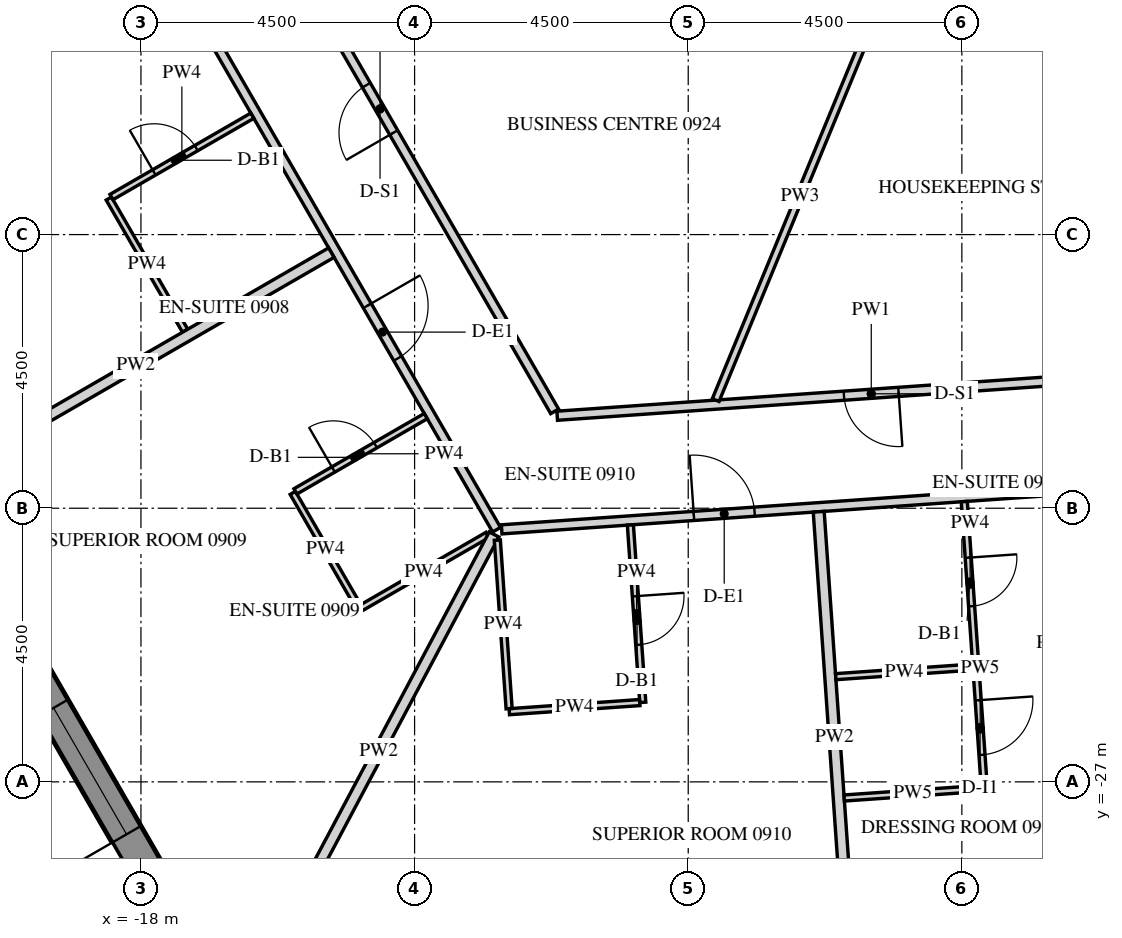
"""IFC4 building model, lengths in metres.
Left out: names, types, materials, properties, quantities, classifications, styles, units other than length and angle.
Written with IfcOpenShell. Run it as: python <this file> out.ifc"""

import sys

from ifc_helpers import new_model, si_unit, direction, frame, frame_2d, origin, place, context, subcontext, project, spatial, polyline, rectangle, outline, extrude, element, fill, save


model = new_model("IFC4")
c1 = context("Model", 3, precision=1e-05, world=origin(), true_north=direction((0.0, 1.0)))
c2 = subcontext(c1, "Body", "Model", "MODEL_VIEW")
j1 = project(units=[si_unit("LENGTHUNIT", "METRE"), si_unit("PLANEANGLEUNIT", "RADIAN")], contexts=[c1])
p1 = place(None, origin())
s1 = spatial("IfcSite", under=j1, at=p1, CompositionType="ELEMENT")
p2 = place(p1, origin())
s2 = spatial("IfcBuilding", under=s1, at=p2, CompositionType="ELEMENT")
p3 = place(p2, frame((0.0, 0.0, 123.3)))
s3 = spatial("IfcBuildingStorey", under=s2, at=p3, CompositionType="ELEMENT", Elevation=123.3)
p4 = place(p3, frame((-32.655, -2.89, -0.15), z_axis=(0.0, 0.0, 1.0), x_axis=(0.499997711317, -0.866026725152, 0.0)))
e1 = element("IfcWall", 1, at=p4, inside=s3, PredefinedType="SOLIDWALL", context=c2, shape_type="SweptSolid", body=[
    extrude(outline(polyline([(-0.022, -0.275), (30.097, -0.275), (30.045, 0.275), (0.022, 0.275), (-0.022, -0.275)])), origin(), (0.0, 0.0, 1.0), 3.9),
])
p5 = place(p4, frame((1.236, 0.0, 1.05)))
e2 = element("IfcOpeningElement", 2, at=p5, cuts=e1, PredefinedType="OPENING", context=c2, shape_type="SweptSolid", body=[
    extrude(rectangle(XDim=2.4, YDim=2.4, at=frame_2d((1.2, 1.2))), frame((0.0, 0.285, 0.0), z_axis=(0.0, -1.0, 0.0), x_axis=(1.0, 0.0, 0.0)), (0.0, 0.0, 1.0), 0.57),
])
p6 = place(p4, frame((4.835, 0.0, 1.05)))
e3 = element("IfcOpeningElement", 3, at=p6, cuts=e1, PredefinedType="OPENING", context=c2, shape_type="SweptSolid", body=[
    extrude(rectangle(XDim=2.4, YDim=2.4, at=frame_2d((1.2, 1.2))), frame((0.0, 0.285, 0.0), z_axis=(0.0, -1.0, 0.0), x_axis=(1.0, 0.0, 0.0)), (0.0, 0.0, 1.0), 0.57),
])
p7 = place(p4, frame((8.436, 0.0, 1.05)))
e4 = element("IfcOpeningElement", 4, at=p7, cuts=e1, PredefinedType="OPENING", context=c2, shape_type="SweptSolid", body=[
    extrude(rectangle(XDim=2.4, YDim=2.4, at=frame_2d((1.2, 1.2))), frame((0.0, 0.285, 0.0), z_axis=(0.0, -1.0, 0.0), x_axis=(1.0, 0.0, 0.0)), (0.0, 0.0, 1.0), 0.57),
])
p8 = place(p4, frame((12.035, 0.0, 1.05)))
e5 = element("IfcOpeningElement", 5, at=p8, cuts=e1, PredefinedType="OPENING", context=c2, shape_type="SweptSolid", body=[
    extrude(rectangle(XDim=2.4, YDim=2.4, at=frame_2d((1.2, 1.2))), frame((0.0, 0.285, 0.0), z_axis=(0.0, -1.0, 0.0), x_axis=(1.0, 0.0, 0.0)), (0.0, 0.0, 1.0), 0.57),
])
p9 = place(p4, frame((15.635, 0.0, 1.05)))
e6 = element("IfcOpeningElement", 6, at=p9, cuts=e1, PredefinedType="OPENING", context=c2, shape_type="SweptSolid", body=[
    extrude(rectangle(XDim=2.4, YDim=2.4, at=frame_2d((1.2, 1.2))), frame((0.0, 0.285, 0.0), z_axis=(0.0, -1.0, 0.0), x_axis=(1.0, 0.0, 0.0)), (0.0, 0.0, 1.0), 0.57),
])
p10 = place(p4, frame((19.236, 0.0, 1.05)))
e7 = element("IfcOpeningElement", 7, at=p10, cuts=e1, PredefinedType="OPENING", context=c2, shape_type="SweptSolid", body=[
    extrude(rectangle(XDim=2.4, YDim=2.4, at=frame_2d((1.2, 1.2))), frame((0.0, 0.285, 0.0), z_axis=(0.0, -1.0, 0.0), x_axis=(1.0, 0.0, 0.0)), (0.0, 0.0, 1.0), 0.57),
])
p11 = place(p4, frame((22.835, 0.0, 1.05)))
e8 = element("IfcOpeningElement", 8, at=p11, cuts=e1, PredefinedType="OPENING", context=c2, shape_type="SweptSolid", body=[
    extrude(rectangle(XDim=2.4, YDim=2.4, at=frame_2d((1.2, 1.2))), frame((0.0, 0.285, 0.0), z_axis=(0.0, -1.0, 0.0), x_axis=(1.0, 0.0, 0.0)), (0.0, 0.0, 1.0), 0.57),
])
p12 = place(p4, frame((26.436, 0.0, 1.05)))
e9 = element("IfcOpeningElement", 9, at=p12, cuts=e1, PredefinedType="OPENING", context=c2, shape_type="SweptSolid", body=[
    extrude(rectangle(XDim=2.4, YDim=2.4, at=frame_2d((1.2, 1.2))), frame((0.0, 0.285, 0.0), z_axis=(0.0, -1.0, 0.0), x_axis=(1.0, 0.0, 0.0)), (0.0, 0.0, 1.0), 0.57),
])
p13 = place(p3, frame((-24.09, -2.175, 0.0), z_axis=(0.0, 0.0, 1.0), x_axis=(0.499996832073, -0.86602723278, 0.0)))
e10 = element("IfcWall", 10, at=p13, inside=s3, PredefinedType="PARTITIONING", context=c2, shape_type="SweptSolid", body=[
    extrude(rectangle(XDim=23.877, YDim=0.15, at=frame_2d((11.938, 0.0))), origin(), (0.0, 0.0, 1.0), 2.988),
])
p14 = place(p13, frame((6.343, 0.0, 0.0)))
e11 = element("IfcOpeningElement", 11, at=p14, cuts=e10, PredefinedType="OPENING", context=c2, shape_type="SweptSolid", body=[
    extrude(rectangle(XDim=1.0, YDim=2.1, at=frame_2d((0.5, 1.05))), frame((0.0, 0.085, 0.0), z_axis=(0.0, -1.0, 0.0), x_axis=(1.0, 0.0, 0.0)), (0.0, 0.0, 1.0), 0.17),
])
p15 = place(p13, frame((13.172, 0.0, 0.0)))
e12 = element("IfcOpeningElement", 12, at=p15, cuts=e10, PredefinedType="OPENING", context=c2, shape_type="SweptSolid", body=[
    extrude(rectangle(XDim=1.0, YDim=2.1, at=frame_2d((0.5, 1.05))), frame((0.0, 0.085, 0.0), z_axis=(0.0, -1.0, 0.0), x_axis=(1.0, 0.0, 0.0)), (0.0, 0.0, 1.0), 0.17),
])
p16 = place(p13, frame((19.625, 0.0, 0.0)))
e13 = element("IfcOpeningElement", 13, at=p16, cuts=e10, PredefinedType="OPENING", context=c2, shape_type="SweptSolid", body=[
    extrude(rectangle(XDim=1.0, YDim=2.1, at=frame_2d((0.5, 1.05))), frame((0.0, 0.085, 0.0), z_axis=(0.0, -1.0, 0.0), x_axis=(1.0, 0.0, 0.0)), (0.0, 0.0, 1.0), 0.17),
])
p17 = place(p3, frame((-12.068, -22.847, 0.0), z_axis=(0.0, 0.0, 1.0), x_axis=(0.99756437486, 0.069751831595, 0.0)))
e14 = element("IfcWall", 14, at=p17, inside=s3, PredefinedType="PARTITIONING", context=c2, shape_type="SweptSolid", body=[
    extrude(rectangle(XDim=22.002, YDim=0.15, at=frame_2d((11.001, 0.0))), origin(), (0.0, 0.0, 1.0), 2.988),
])
p18 = place(p17, frame((3.169, 0.0, 0.0)))
e15 = element("IfcOpeningElement", 15, at=p18, cuts=e14, PredefinedType="OPENING", context=c2, shape_type="SweptSolid", body=[
    extrude(rectangle(XDim=1.0, YDim=2.1, at=frame_2d((0.5, 1.05))), frame((0.0, 0.085, 0.0), z_axis=(0.0, -1.0, 0.0), x_axis=(1.0, 0.0, 0.0)), (0.0, 0.0, 1.0), 0.17),
])
p19 = place(p17, frame((13.121, 0.0, 0.0)))
e16 = element("IfcOpeningElement", 16, at=p19, cuts=e14, PredefinedType="OPENING", context=c2, shape_type="SweptSolid", body=[
    extrude(rectangle(XDim=1.0, YDim=2.1, at=frame_2d((0.5, 1.05))), frame((0.0, 0.085, 0.0), z_axis=(0.0, -1.0, 0.0), x_axis=(1.0, 0.0, 0.0)), (0.0, 0.0, 1.0), 0.17),
])
p20 = place(p17, frame((20.852, 0.0, 0.0)))
e17 = element("IfcOpeningElement", 17, at=p20, cuts=e14, PredefinedType="OPENING", context=c2, shape_type="SweptSolid", body=[
    extrude(rectangle(XDim=1.0, YDim=2.1, at=frame_2d((0.5, 1.05))), frame((0.0, 0.085, 0.0), z_axis=(0.0, -1.0, 0.0), x_axis=(1.0, 0.0, 0.0)), (0.0, 0.0, 1.0), 0.17),
])
p21 = place(p3, frame((-0.825, -20.257, 0.0), z_axis=(0.0, 0.0, 1.0), x_axis=(-0.9975635143, -0.069764137903, 0.0)))
e18 = element("IfcWall", 18, at=p21, inside=s3, PredefinedType="PARTITIONING", context=c2, shape_type="SweptSolid", body=[
    extrude(rectangle(XDim=10.355, YDim=0.15, at=frame_2d((5.177, 0.0))), origin(), (0.0, 0.0, 1.0), 2.988),
])
p22 = place(p21, frame((4.728, 0.0, 0.0)))
e19 = element("IfcOpeningElement", 19, at=p22, cuts=e18, PredefinedType="OPENING", context=c2, shape_type="SweptSolid", body=[
    extrude(rectangle(XDim=0.9, YDim=2.1, at=frame_2d((0.45, 1.05))), frame((0.0, 0.085, 0.0), z_axis=(0.0, -1.0, 0.0), x_axis=(1.0, 0.0, 0.0)), (0.0, 0.0, 1.0), 0.17),
])
p23 = place(p3, frame((-11.197, -20.907, 0.0), z_axis=(0.0, 0.0, 1.0), x_axis=(-0.500004557924, 0.86602277225, 0.0)))
e20 = element("IfcWall", 20, at=p23, inside=s3, PredefinedType="PARTITIONING", context=c2, shape_type="SweptSolid", body=[
    extrude(rectangle(XDim=11.487, YDim=0.15, at=frame_2d((5.743, 0.0))), origin(), (0.0, 0.0, 1.0), 2.988),
])
p24 = place(p23, frame((5.293, 0.0, 0.0)))
e21 = element("IfcOpeningElement", 21, at=p24, cuts=e20, PredefinedType="OPENING", context=c2, shape_type="SweptSolid", body=[
    extrude(rectangle(XDim=0.9, YDim=2.1, at=frame_2d((0.45, 1.05))), frame((0.0, 0.085, 0.0), z_axis=(0.0, -1.0, 0.0), x_axis=(1.0, 0.0, 0.0)), (0.0, 0.0, 1.0), 0.17),
])
p25 = place(p3, frame((-24.899, -15.774, 0.0), z_axis=(0.0, 0.0, 1.0), x_axis=(0.866028983062, 0.499993800457, 0.0)))
e22 = element("IfcWall", 22, at=p25, inside=s3, PredefinedType="PARTITIONING", context=c2, shape_type="SweptSolid", body=[
    extrude(rectangle(XDim=7.425, YDim=0.18, at=frame_2d((3.712, 0.0))), origin(), (0.0, 0.0, 1.0), 2.988),
])
p26 = place(p3, frame((-17.274, -19.581, 0.0), z_axis=(0.0, 0.0, 1.0), x_axis=(-0.499946979623, 0.86605601295, 0.0)))
e23 = element("IfcWall", 23, at=p26, inside=s3, PredefinedType="PARTITIONING", context=c2, shape_type="SweptSolid", body=[
    extrude(rectangle(XDim=2.51, YDim=0.1, at=frame_2d((1.255, 0.0))), origin(), (0.0, 0.0, 1.0), 2.988),
])
p27 = place(p3, frame((-18.485, -17.383, 0.0), z_axis=(0.0, 0.0, 1.0), x_axis=(0.866004723184, 0.50003581814, 0.0)))
e24 = element("IfcWall", 24, at=p27, inside=s3, PredefinedType="PARTITIONING", context=c2, shape_type="SweptSolid", body=[
    extrude(rectangle(XDim=2.675, YDim=0.1, at=frame_2d((1.337, 0.0))), origin(), (0.0, 0.0, 1.0), 2.988),
])
p28 = place(p27, frame((0.81, 0.0, 0.0)))
e25 = element("IfcOpeningElement", 25, at=p28, cuts=e24, PredefinedType="OPENING", context=c2, shape_type="SweptSolid", body=[
    extrude(rectangle(XDim=0.8, YDim=2.1, at=frame_2d((0.4, 1.05))), frame((0.0, 0.06, 0.0), z_axis=(0.0, -1.0, 0.0), x_axis=(1.0, 0.0, 0.0)), (0.0, 0.0, 1.0), 0.12),
])
p29 = place(p3, frame((-21.299, -22.009, 0.0), z_axis=(0.0, 0.0, 1.0), x_axis=(0.866014745021, 0.500018461065, 0.0)))
e26 = element("IfcWall", 26, at=p29, inside=s3, PredefinedType="PARTITIONING", context=c2, shape_type="SweptSolid", body=[
    extrude(rectangle(XDim=7.425, YDim=0.18, at=frame_2d((3.712, 0.0))), origin(), (0.0, 0.0, 1.0), 2.988),
])
p30 = place(p3, frame((-12.3, -22.939, 0.0), z_axis=(0.0, 0.0, 1.0), x_axis=(-0.866044985707, -0.499966081581, 0.0)))
e27 = element("IfcWall", 27, at=p30, inside=s3, PredefinedType="PARTITIONING", context=c2, shape_type="SweptSolid", body=[
    extrude(rectangle(XDim=2.429, YDim=0.1, at=frame_2d((1.214, 0.0))), origin(), (0.0, 0.0, 1.0), 2.988),
])
p31 = place(p3, frame((-14.428, -24.11, 0.0), z_axis=(0.0, 0.0, 1.0), x_axis=(-0.499961633463, 0.866047553582, 0.0)))
e28 = element("IfcWall", 28, at=p31, inside=s3, PredefinedType="PARTITIONING", context=c2, shape_type="SweptSolid", body=[
    extrude(rectangle(XDim=2.15, YDim=0.1, at=frame_2d((1.075, 0.0))), origin(), (0.0, 0.0, 1.0), 2.988),
])
p32 = place(p3, frame((-15.46, -22.223, 0.0), z_axis=(0.0, 0.0, 1.0), x_axis=(0.866031185235, 0.4999899861, 0.0)))
e29 = element("IfcWall", 29, at=p32, inside=s3, PredefinedType="PARTITIONING", context=c2, shape_type="SweptSolid", body=[
    extrude(rectangle(XDim=2.475, YDim=0.1, at=frame_2d((1.238, 0.0))), origin(), (0.0, 0.0, 1.0), 2.988),
])
p33 = place(p32, frame((0.72, 0.0, 0.0)))
e30 = element("IfcOpeningElement", 30, at=p33, cuts=e29, PredefinedType="OPENING", context=c2, shape_type="SweptSolid", body=[
    extrude(rectangle(XDim=0.8, YDim=2.1, at=frame_2d((0.4, 1.05))), frame((0.0, 0.06, 0.0), z_axis=(0.0, -1.0, 0.0), x_axis=(1.0, 0.0, 0.0)), (0.0, 0.0, 1.0), 0.12),
])
p34 = place(p3, frame((-15.983, -30.059, 0.0), z_axis=(0.0, 0.0, 1.0), x_axis=(0.469476547643, 0.882944942346, 0.0)))
e31 = element("IfcWall", 31, at=p34, inside=s3, PredefinedType="PARTITIONING", context=c2, shape_type="SweptSolid", body=[
    extrude(rectangle(XDim=8.073, YDim=0.18, at=frame_2d((4.037, 0.0))), origin(), (0.0, 0.0, 1.0), 2.988),
])
p35 = place(p3, frame((-9.951, -22.775, 0.0), z_axis=(0.0, 0.0, 1.0), x_axis=(0.069775971057, -0.997562686683, 0.0)))
e32 = element("IfcWall", 32, at=p35, inside=s3, PredefinedType="PARTITIONING", context=c2, shape_type="SweptSolid", body=[
    extrude(rectangle(XDim=2.925, YDim=0.1, at=frame_2d((1.462, 0.0))), origin(), (0.0, 0.0, 1.0), 2.988),
])
p36 = place(p35, frame((1.175, 0.0, 0.0)))
e33 = element("IfcOpeningElement", 33, at=p36, cuts=e32, PredefinedType="OPENING", context=c2, shape_type="SweptSolid", body=[
    extrude(rectangle(XDim=0.8, YDim=2.1, at=frame_2d((0.4, 1.05))), frame((0.0, 0.06, 0.0), z_axis=(0.0, -1.0, 0.0), x_axis=(1.0, 0.0, 0.0)), (0.0, 0.0, 1.0), 0.12),
])
p37 = place(p3, frame((-9.797, -25.696, 0.0), z_axis=(0.0, 0.0, 1.0), x_axis=(-0.997566475845, -0.069721777595, 0.0)))
e34 = element("IfcWall", 34, at=p37, inside=s3, PredefinedType="PARTITIONING", context=c2, shape_type="SweptSolid", body=[
    extrude(rectangle(XDim=2.15, YDim=0.1, at=frame_2d((1.075, 0.0))), origin(), (0.0, 0.0, 1.0), 2.988),
])
p38 = place(p3, frame((-11.946, -25.796, 0.0), z_axis=(0.0, 0.0, 1.0), x_axis=(-0.069754817075, 0.997564166104, 0.0)))
e35 = element("IfcWall", 35, at=p38, inside=s3, PredefinedType="PARTITIONING", context=c2, shape_type="SweptSolid", body=[
    extrude(rectangle(XDim=2.779, YDim=0.1, at=frame_2d((1.39, 0.0))), origin(), (0.0, 0.0, 1.0), 2.988),
])
p39 = place(p3, frame((-6.336, -29.965, 0.0), z_axis=(0.0, 0.0, 1.0), x_axis=(-0.06977252161, 0.997562927954, 0.0)))
e36 = element("IfcWall", 36, at=p39, inside=s3, PredefinedType="PARTITIONING", context=c2, shape_type="SweptSolid", body=[
    extrude(rectangle(XDim=7.425, YDim=0.18, at=frame_2d((3.712, 0.0))), origin(), (0.0, 0.0, 1.0), 2.988),
])
p40 = place(p3, frame((-4.46, -22.391, 0.0), z_axis=(0.0, 0.0, 1.0), x_axis=(0.069699857203, -0.99756800766, 0.0)))
e37 = element("IfcWall", 37, at=p40, inside=s3, PredefinedType="PARTITIONING", context=c2, shape_type="SweptSolid", body=[
    extrude(rectangle(XDim=2.725, YDim=0.1, at=frame_2d((1.363, 0.0))), origin(), (0.0, 0.0, 1.0), 2.988),
])
p41 = place(p40, frame((0.925, 0.0, 0.0)))
e38 = element("IfcOpeningElement", 38, at=p41, cuts=e37, PredefinedType="OPENING", context=c2, shape_type="SweptSolid", body=[
    extrude(rectangle(XDim=0.8, YDim=2.1, at=frame_2d((0.4, 1.05))), frame((0.0, 0.06, 0.0), z_axis=(0.0, -1.0, 0.0), x_axis=(1.0, 0.0, 0.0)), (0.0, 0.0, 1.0), 0.12),
])
p42 = place(p3, frame((-4.267, -25.159, 0.0), z_axis=(0.0, 0.0, 1.0), x_axis=(0.06985902805, -0.997556873667, 0.0)))
e39 = element("IfcWall", 39, at=p42, inside=s3, PredefinedType="PARTITIONING", context=c2, shape_type="SweptSolid", body=[
    extrude(rectangle(XDim=1.95, YDim=0.1, at=frame_2d((0.975, 0.0))), origin(), (0.0, 0.0, 1.0), 2.988),
])
p43 = place(p42, frame((0.5, 0.0, 0.0)))
e40 = element("IfcOpeningElement", 40, at=p43, cuts=e39, PredefinedType="OPENING", context=c2, shape_type="SweptSolid", body=[
    extrude(rectangle(XDim=0.9, YDim=2.1, at=frame_2d((0.45, 1.05))), frame((0.0, 0.06, 0.0), z_axis=(0.0, -1.0, 0.0), x_axis=(1.0, 0.0, 0.0)), (0.0, 0.0, 1.0), 0.12),
])
p44 = place(p3, frame((-4.18, -27.108, 0.0), z_axis=(0.0, 0.0, 1.0), x_axis=(-0.997561825928, -0.069788275888, 0.0)))
e41 = element("IfcWall", 41, at=p44, inside=s3, PredefinedType="PARTITIONING", context=c2, shape_type="SweptSolid", body=[
    extrude(rectangle(XDim=2.26, YDim=0.1, at=frame_2d((1.13, 0.0))), origin(), (0.0, 0.0, 1.0), 2.988),
])
p45 = place(p3, frame((-6.574, -25.27, 0.0), z_axis=(0.0, 0.0, 1.0), x_axis=(0.997562351999, 0.069780755754, 0.0)))
e42 = element("IfcWall", 42, at=p45, inside=s3, PredefinedType="PARTITIONING", context=c2, shape_type="SweptSolid", body=[
    extrude(rectangle(XDim=2.26, YDim=0.1, at=frame_2d((1.13, 0.0))), origin(), (0.0, 0.0, 1.0), 2.988),
])
p46 = place(p3, frame((-5.775, -14.0, 0.0), z_axis=(0.0, 0.0, 1.0), x_axis=(-0.381361051417, -0.924426172532, 0.0)))
e43 = element("IfcWall", 43, at=p46, inside=s3, PredefinedType="PARTITIONING", context=c2, shape_type="SweptSolid", body=[
    extrude(rectangle(XDim=7.271, YDim=0.12, at=frame_2d((3.636, 0.0))), origin(), (0.0, 0.0, 1.0), 2.988),
])
p47 = place(p12, frame((0.0, 0.205, 0.0)))
e44 = element("IfcWindow", 44, at=p47, inside=s3, PartitioningType="DOUBLE_PANEL_VERTICAL", PredefinedType="WINDOW", context=c2, shape_type="SweptSolid", body=[
    extrude(rectangle(XDim=2.4, YDim=2.4, at=frame_2d((1.2, 1.2))), frame((0.0, 0.03, 0.0), z_axis=(0.0, -1.0, 0.0), x_axis=(1.0, 0.0, 0.0)), (0.0, 0.0, 1.0), 0.06),
])
fill(e9, e44)
p48 = place(p28, origin())
e45 = element("IfcDoor", 45, at=p48, inside=s3, OperationType="SINGLE_SWING_RIGHT", PredefinedType="DOOR", context=c2, shape_type="SweptSolid", body=[
    extrude(rectangle(XDim=0.8, YDim=2.1, at=frame_2d((0.4, 1.05))), frame((0.0, 0.025, 0.0), z_axis=(0.0, -1.0, 0.0), x_axis=(1.0, 0.0, 0.0)), (0.0, 0.0, 1.0), 0.05),
])
fill(e25, e45)
p49 = place(p16, origin())
e46 = element("IfcDoor", 46, at=p49, inside=s3, OperationType="SINGLE_SWING_RIGHT", PredefinedType="DOOR", context=c2, shape_type="SweptSolid", body=[
    extrude(rectangle(XDim=1.0, YDim=2.1, at=frame_2d((0.5, 1.05))), frame((0.0, 0.025, 0.0), z_axis=(0.0, -1.0, 0.0), x_axis=(1.0, 0.0, 0.0)), (0.0, 0.0, 1.0), 0.05),
])
fill(e13, e46)
p50 = place(p33, origin())
e47 = element("IfcDoor", 47, at=p50, inside=s3, OperationType="SINGLE_SWING_RIGHT", PredefinedType="DOOR", context=c2, shape_type="SweptSolid", body=[
    extrude(rectangle(XDim=0.8, YDim=2.1, at=frame_2d((0.4, 1.05))), frame((0.0, 0.025, 0.0), z_axis=(0.0, -1.0, 0.0), x_axis=(1.0, 0.0, 0.0)), (0.0, 0.0, 1.0), 0.05),
])
fill(e30, e47)
p51 = place(p18, origin())
e48 = element("IfcDoor", 48, at=p51, inside=s3, OperationType="SINGLE_SWING_LEFT", PredefinedType="DOOR", context=c2, shape_type="SweptSolid", body=[
    extrude(rectangle(XDim=1.0, YDim=2.1, at=frame_2d((0.5, 1.05))), frame((0.0, 0.025, 0.0), z_axis=(0.0, -1.0, 0.0), x_axis=(1.0, 0.0, 0.0)), (0.0, 0.0, 1.0), 0.05),
])
fill(e15, e48)
p52 = place(p36, origin())
e49 = element("IfcDoor", 49, at=p52, inside=s3, OperationType="SINGLE_SWING_LEFT", PredefinedType="DOOR", context=c2, shape_type="SweptSolid", body=[
    extrude(rectangle(XDim=0.8, YDim=2.1, at=frame_2d((0.4, 1.05))), frame((0.0, 0.025, 0.0), z_axis=(0.0, -1.0, 0.0), x_axis=(1.0, 0.0, 0.0)), (0.0, 0.0, 1.0), 0.05),
])
fill(e33, e49)
p53 = place(p41, origin())
e50 = element("IfcDoor", 50, at=p53, inside=s3, OperationType="SINGLE_SWING_RIGHT", PredefinedType="DOOR", context=c2, shape_type="SweptSolid", body=[
    extrude(rectangle(XDim=0.8, YDim=2.1, at=frame_2d((0.4, 1.05))), frame((0.0, 0.025, 0.0), z_axis=(0.0, -1.0, 0.0), x_axis=(1.0, 0.0, 0.0)), (0.0, 0.0, 1.0), 0.05),
])
fill(e38, e50)
p54 = place(p43, origin())
e51 = element("IfcDoor", 51, at=p54, inside=s3, OperationType="SINGLE_SWING_RIGHT", PredefinedType="DOOR", context=c2, shape_type="SweptSolid", body=[
    extrude(rectangle(XDim=0.9, YDim=2.1, at=frame_2d((0.45, 1.05))), frame((0.0, 0.025, 0.0), z_axis=(0.0, -1.0, 0.0), x_axis=(1.0, 0.0, 0.0)), (0.0, 0.0, 1.0), 0.05),
])
fill(e40, e51)
p55 = place(p22, origin())
e52 = element("IfcDoor", 52, at=p55, inside=s3, OperationType="SINGLE_SWING_LEFT", PredefinedType="DOOR", context=c2, shape_type="SweptSolid", body=[
    extrude(rectangle(XDim=0.9, YDim=2.1, at=frame_2d((0.45, 1.05))), frame((0.0, 0.025, 0.0), z_axis=(0.0, -1.0, 0.0), x_axis=(1.0, 0.0, 0.0)), (0.0, 0.0, 1.0), 0.05),
])
fill(e19, e52)
p56 = place(p24, origin())
e53 = element("IfcDoor", 53, at=p56, inside=s3, OperationType="SINGLE_SWING_RIGHT", PredefinedType="DOOR", context=c2, shape_type="SweptSolid", body=[
    extrude(rectangle(XDim=0.9, YDim=2.1, at=frame_2d((0.45, 1.05))), frame((0.0, 0.025, 0.0), z_axis=(0.0, -1.0, 0.0), x_axis=(1.0, 0.0, 0.0)), (0.0, 0.0, 1.0), 0.05),
])
fill(e21, e53)
save(model, sys.argv[1])
